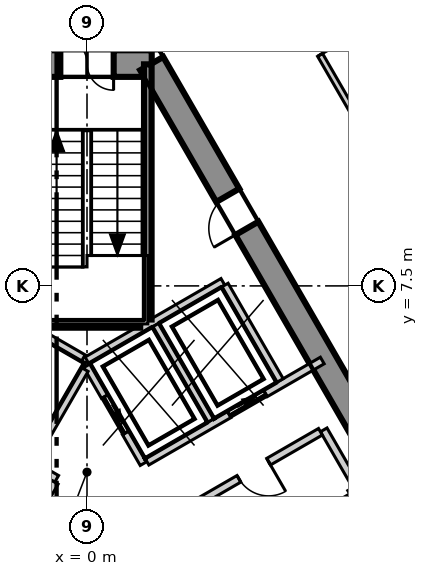
"""IFC4 building model, lengths in metres.
Left out: names, types, materials, properties, quantities, classifications, styles, units other than length and angle.
Written with IfcOpenShell. Run it as: python <this file> out.ifc"""

import sys

from ifc_helpers import new_model, si_unit, direction, frame, frame_2d, origin, place, context, subcontext, project, spatial, polyline, rectangle, outline, extrude, element, fill, save


model = new_model("IFC4")
c1 = context("Model", 3, precision=1e-05, world=origin(), true_north=direction((0.0, 1.0)))
c2 = subcontext(c1, "Body", "Model", "MODEL_VIEW")
j1 = project(units=[si_unit("LENGTHUNIT", "METRE"), si_unit("PLANEANGLEUNIT", "RADIAN")], contexts=[c1])
p1 = place(None, origin())
s1 = spatial("IfcSite", under=j1, at=p1, CompositionType="ELEMENT")
p2 = place(p1, origin())
s2 = spatial("IfcBuilding", under=s1, at=p2, CompositionType="ELEMENT")
p3 = place(p2, frame((0.0, 0.0, 203.3)))
s3 = spatial("IfcBuildingStorey", under=s2, at=p3, CompositionType="ELEMENT", Elevation=203.3)
p4 = place(p3, frame((1.703, 13.35, -0.3), z_axis=(0.0, 0.0, 1.0), x_axis=(-1.0, 0.0, 0.0)))
e1 = element("IfcWall", 1, at=p4, inside=s3, PredefinedType="SHEAR", context=c2, shape_type="SweptSolid", body=[
    extrude(outline(polyline([(-0.202, -0.35), (1.703, -0.35), (3.608, -0.35), (3.204, 0.35), (1.703, 0.35), (0.202, 0.35), (-0.202, -0.35)])), origin(), (0.0, 0.0, 1.0), 4.0),
])
p5 = place(p4, frame((1.003, 0.0, 0.3)))
e2 = element("IfcOpeningElement", 2, at=p5, cuts=e1, PredefinedType="OPENING", context=c2, shape_type="SweptSolid", body=[
    extrude(rectangle(XDim=1.4, YDim=2.1, at=frame_2d((0.7, 1.05))), frame((0.0, 0.36, 0.0), z_axis=(0.0, -1.0, 0.0), x_axis=(1.0, 0.0, 0.0)), (0.0, 0.0, 1.0), 0.72),
])
p6 = place(p3, frame((12.413, -5.2, -0.3), z_axis=(0.0, 0.0, 1.0), x_axis=(-0.500011533395, 0.866018744874, 0.0)))
e3 = element("IfcWall", 3, at=p6, inside=s3, PredefinedType="SHEAR", context=c2, shape_type="SweptSolid", body=[
    extrude(outline(polyline([(-0.202, -0.35), (1.782, -0.35), (3.766, -0.35), (5.75, -0.35), (7.734, -0.35), (9.718, -0.35), (11.702, -0.35), (13.686, -0.35), (15.67, -0.35), (17.654, -0.35), (19.638, -0.35), (21.622, -0.35), (21.218, 0.35), (19.307, 0.35), (17.397, 0.35), (15.486, 0.35), (13.576, 0.35), (11.665, 0.35), (9.755, 0.35), (7.844, 0.35), (5.934, 0.35), (4.023, 0.35), (2.113, 0.35), (0.202, 0.35), (-0.202, -0.35)])), origin(), (0.0, 0.0, 1.0), 4.0),
])
p7 = place(p6, frame((4.055, 0.0, 0.3)))
e4 = element("IfcOpeningElement", 4, at=p7, cuts=e3, PredefinedType="OPENING", context=c2, shape_type="SweptSolid", body=[
    extrude(rectangle(XDim=0.9, YDim=2.1, at=frame_2d((0.45, 1.05))), frame((0.0, 0.36, 0.0), z_axis=(0.0, -1.0, 0.0), x_axis=(1.0, 0.0, 0.0)), (0.0, 0.0, 1.0), 0.72),
])
p8 = place(p6, frame((16.415, 0.0, 0.3)))
e5 = element("IfcOpeningElement", 5, at=p8, cuts=e3, PredefinedType="OPENING", context=c2, shape_type="SweptSolid", body=[
    extrude(rectangle(XDim=1.0, YDim=2.1, at=frame_2d((0.5, 1.05))), frame((0.0, 0.36, 0.0), z_axis=(0.0, -1.0, 0.0), x_axis=(1.0, 0.0, 0.0)), (0.0, 0.0, 1.0), 0.72),
])
p9 = place(p3, frame((28.704, -13.311, 0.0), z_axis=(0.0, 0.0, 1.0), x_axis=(-0.500010281129, 0.866019467891, 0.0)))
e6 = element("IfcWall", 6, at=p9, inside=s3, PredefinedType="ELEMENTEDWALL", context=c2, shape_type="SweptSolid", body=[
    extrude(rectangle(XDim=51.739, YDim=0.2, at=frame_2d((25.87, 0.0))), origin(), (0.0, 0.0, 1.0), 3.7),
])
p10 = place(p9, frame((2.275, 0.0, 0.9)))
e7 = element("IfcOpeningElement", 7, at=p10, cuts=e6, PredefinedType="OPENING", context=c2, shape_type="SweptSolid", body=[
    extrude(rectangle(XDim=4.2, YDim=2.5, at=frame_2d((2.1, 1.25))), frame((0.0, 0.11, 0.0), z_axis=(0.0, -1.0, 0.0), x_axis=(1.0, 0.0, 0.0)), (0.0, 0.0, 1.0), 0.22),
])
p11 = place(p9, frame((8.419, 0.0, 0.9)))
e8 = element("IfcOpeningElement", 8, at=p11, cuts=e6, PredefinedType="OPENING", context=c2, shape_type="SweptSolid", body=[
    extrude(rectangle(XDim=4.2, YDim=2.5, at=frame_2d((2.1, 1.25))), frame((0.0, 0.11, 0.0), z_axis=(0.0, -1.0, 0.0), x_axis=(1.0, 0.0, 0.0)), (0.0, 0.0, 1.0), 0.22),
])
p12 = place(p9, frame((14.563, 0.0, 0.9)))
e9 = element("IfcOpeningElement", 9, at=p12, cuts=e6, PredefinedType="OPENING", context=c2, shape_type="SweptSolid", body=[
    extrude(rectangle(XDim=4.2, YDim=2.5, at=frame_2d((2.1, 1.25))), frame((0.0, 0.11, 0.0), z_axis=(0.0, -1.0, 0.0), x_axis=(1.0, 0.0, 0.0)), (0.0, 0.0, 1.0), 0.22),
])
p13 = place(p9, frame((20.707, 0.0, 0.9)))
e10 = element("IfcOpeningElement", 10, at=p13, cuts=e6, PredefinedType="OPENING", context=c2, shape_type="SweptSolid", body=[
    extrude(rectangle(XDim=4.2, YDim=2.5, at=frame_2d((2.1, 1.25))), frame((0.0, 0.11, 0.0), z_axis=(0.0, -1.0, 0.0), x_axis=(1.0, 0.0, 0.0)), (0.0, 0.0, 1.0), 0.22),
])
p14 = place(p9, frame((26.852, 0.0, 0.9)))
e11 = element("IfcOpeningElement", 11, at=p14, cuts=e6, PredefinedType="OPENING", context=c2, shape_type="SweptSolid", body=[
    extrude(rectangle(XDim=4.2, YDim=2.5, at=frame_2d((2.1, 1.25))), frame((0.0, 0.11, 0.0), z_axis=(0.0, -1.0, 0.0), x_axis=(1.0, 0.0, 0.0)), (0.0, 0.0, 1.0), 0.22),
])
p15 = place(p9, frame((32.996, 0.0, 0.9)))
e12 = element("IfcOpeningElement", 12, at=p15, cuts=e6, PredefinedType="OPENING", context=c2, shape_type="SweptSolid", body=[
    extrude(rectangle(XDim=4.2, YDim=2.5, at=frame_2d((2.1, 1.25))), frame((0.0, 0.11, 0.0), z_axis=(0.0, -1.0, 0.0), x_axis=(1.0, 0.0, 0.0)), (0.0, 0.0, 1.0), 0.22),
])
p16 = place(p9, frame((39.14, 0.0, 0.9)))
e13 = element("IfcOpeningElement", 13, at=p16, cuts=e6, PredefinedType="OPENING", context=c2, shape_type="SweptSolid", body=[
    extrude(rectangle(XDim=4.2, YDim=2.5, at=frame_2d((2.1, 1.25))), frame((0.0, 0.11, 0.0), z_axis=(0.0, -1.0, 0.0), x_axis=(1.0, 0.0, 0.0)), (0.0, 0.0, 1.0), 0.22),
])
p17 = place(p9, frame((45.284, 0.0, 0.9)))
e14 = element("IfcOpeningElement", 14, at=p17, cuts=e6, PredefinedType="OPENING", context=c2, shape_type="SweptSolid", body=[
    extrude(rectangle(XDim=4.2, YDim=2.5, at=frame_2d((2.1, 1.25))), frame((0.0, 0.11, 0.0), z_axis=(0.0, -1.0, 0.0), x_axis=(1.0, 0.0, 0.0)), (0.0, 0.0, 1.0), 0.22),
])
p18 = place(p3, frame((-20.883, -11.97, 0.0), z_axis=(0.0, 0.0, 1.0), x_axis=(0.500006150555, 0.866021852731, 0.0)))
e15 = element("IfcWall", 15, at=p18, inside=s3, PredefinedType="PARTITIONING", context=c2, shape_type="SweptSolid", body=[
    extrude(rectangle(XDim=41.766, YDim=0.15, at=frame_2d((20.883, 0.0))), origin(), (0.0, 0.0, 1.0), 3.7),
])
p19 = place(p18, frame((36.916, 0.0, 0.0)))
e16 = element("IfcOpeningElement", 16, at=p19, cuts=e15, PredefinedType="OPENING", context=c2, shape_type="SweptSolid", body=[
    extrude(rectangle(XDim=1.1, YDim=2.1, at=frame_2d((0.55, 1.05))), frame((0.0, 0.085, 0.0), z_axis=(0.0, -1.0, 0.0), x_axis=(1.0, 0.0, 0.0)), (0.0, 0.0, 1.0), 0.17),
])
p20 = place(p18, frame((26.446, 0.0, 0.0)))
e17 = element("IfcOpeningElement", 17, at=p20, cuts=e15, PredefinedType="OPENING", context=c2, shape_type="SweptSolid", body=[
    extrude(rectangle(XDim=1.1, YDim=2.1, at=frame_2d((0.55, 1.05))), frame((0.0, 0.085, 0.0), z_axis=(0.0, -1.0, 0.0), x_axis=(1.0, 0.0, 0.0)), (0.0, 0.0, 1.0), 0.17),
])
p21 = place(p18, frame((9.757, 0.0, 0.0)))
e18 = element("IfcOpeningElement", 18, at=p21, cuts=e15, PredefinedType="OPENING", context=c2, shape_type="SweptSolid", body=[
    extrude(rectangle(XDim=1.1, YDim=2.1, at=frame_2d((0.55, 1.05))), frame((0.0, 0.085, 0.0), z_axis=(0.0, -1.0, 0.0), x_axis=(1.0, 0.0, 0.0)), (0.0, 0.0, 1.0), 0.17),
])
p22 = place(p18, frame((18.757, 0.0, 0.0)))
e19 = element("IfcOpeningElement", 19, at=p22, cuts=e15, PredefinedType="OPENING", context=c2, shape_type="SweptSolid", body=[
    extrude(rectangle(XDim=0.9, YDim=2.1, at=frame_2d((0.45, 1.05))), frame((0.0, 0.085, 0.0), z_axis=(0.0, -1.0, 0.0), x_axis=(1.0, 0.0, 0.0)), (0.0, 0.0, 1.0), 0.17),
])
p23 = place(p18, frame((15.557, 0.0, 0.0)))
e20 = element("IfcOpeningElement", 20, at=p23, cuts=e15, PredefinedType="OPENING", context=c2, shape_type="SweptSolid", body=[
    extrude(rectangle(XDim=0.9, YDim=2.1, at=frame_2d((0.45, 1.05))), frame((0.0, 0.085, 0.0), z_axis=(0.0, -1.0, 0.0), x_axis=(1.0, 0.0, 0.0)), (0.0, 0.0, 1.0), 0.17),
])
p24 = place(p18, frame((12.657, 0.0, 0.0)))
e21 = element("IfcOpeningElement", 21, at=p24, cuts=e15, PredefinedType="OPENING", context=c2, shape_type="SweptSolid", body=[
    extrude(rectangle(XDim=1.0, YDim=2.1, at=frame_2d((0.5, 1.05))), frame((0.0, 0.085, 0.0), z_axis=(0.0, -1.0, 0.0), x_axis=(1.0, 0.0, 0.0)), (0.0, 0.0, 1.0), 0.17),
])
p25 = place(p18, frame((3.669, 0.0, 0.0)))
e22 = element("IfcOpeningElement", 22, at=p25, cuts=e15, PredefinedType="OPENING", context=c2, shape_type="SweptSolid", body=[
    extrude(rectangle(XDim=1.1, YDim=2.1, at=frame_2d((0.55, 1.05))), frame((0.0, 0.085, 0.0), z_axis=(0.0, -1.0, 0.0), x_axis=(1.0, 0.0, 0.0)), (0.0, 0.0, 1.0), 0.17),
])
p26 = place(p3, frame((0.075, 24.07, 0.0), z_axis=(0.0, 0.0, 1.0), x_axis=(0.500006834213, -0.866021458014, 0.0)))
e23 = element("IfcWall", 23, at=p26, inside=s3, PredefinedType="PARTITIONING", context=c2, shape_type="SweptSolid", body=[
    extrude(rectangle(XDim=41.616, YDim=0.15, at=frame_2d((20.808, 0.0))), origin(), (0.0, 0.0, 1.0), 3.7),
])
p27 = place(p26, frame((36.915, 0.0, 0.0)))
e24 = element("IfcOpeningElement", 24, at=p27, cuts=e23, PredefinedType="OPENING", context=c2, shape_type="SweptSolid", body=[
    extrude(rectangle(XDim=1.1, YDim=2.1, at=frame_2d((0.55, 1.05))), frame((0.0, 0.085, 0.0), z_axis=(0.0, -1.0, 0.0), x_axis=(1.0, 0.0, 0.0)), (0.0, 0.0, 1.0), 0.17),
])
p28 = place(p26, frame((22.046, 0.0, 0.0)))
e25 = element("IfcOpeningElement", 25, at=p28, cuts=e23, PredefinedType="OPENING", context=c2, shape_type="SweptSolid", body=[
    extrude(rectangle(XDim=1.1, YDim=2.1, at=frame_2d((0.55, 1.05))), frame((0.0, 0.085, 0.0), z_axis=(0.0, -1.0, 0.0), x_axis=(1.0, 0.0, 0.0)), (0.0, 0.0, 1.0), 0.17),
])
p29 = place(p26, frame((31.046, 0.0, 0.0)))
e26 = element("IfcOpeningElement", 26, at=p29, cuts=e23, PredefinedType="OPENING", context=c2, shape_type="SweptSolid", body=[
    extrude(rectangle(XDim=0.9, YDim=2.1, at=frame_2d((0.45, 1.05))), frame((0.0, 0.085, 0.0), z_axis=(0.0, -1.0, 0.0), x_axis=(1.0, 0.0, 0.0)), (0.0, 0.0, 1.0), 0.17),
])
p30 = place(p26, frame((27.846, 0.0, 0.0)))
e27 = element("IfcOpeningElement", 27, at=p30, cuts=e23, PredefinedType="OPENING", context=c2, shape_type="SweptSolid", body=[
    extrude(rectangle(XDim=0.9, YDim=2.1, at=frame_2d((0.45, 1.05))), frame((0.0, 0.085, 0.0), z_axis=(0.0, -1.0, 0.0), x_axis=(1.0, 0.0, 0.0)), (0.0, 0.0, 1.0), 0.17),
])
p31 = place(p26, frame((24.946, 0.0, 0.0)))
e28 = element("IfcOpeningElement", 28, at=p31, cuts=e23, PredefinedType="OPENING", context=c2, shape_type="SweptSolid", body=[
    extrude(rectangle(XDim=1.0, YDim=2.1, at=frame_2d((0.5, 1.05))), frame((0.0, 0.085, 0.0), z_axis=(0.0, -1.0, 0.0), x_axis=(1.0, 0.0, 0.0)), (0.0, 0.0, 1.0), 0.17),
])
p32 = place(p26, frame((17.258, 0.0, 0.0)))
e29 = element("IfcOpeningElement", 29, at=p32, cuts=e23, PredefinedType="OPENING", context=c2, shape_type="SweptSolid", body=[
    extrude(rectangle(XDim=1.0, YDim=2.1, at=frame_2d((0.5, 1.05))), frame((0.0, 0.085, 0.0), z_axis=(0.0, -1.0, 0.0), x_axis=(1.0, 0.0, 0.0)), (0.0, 0.0, 1.0), 0.17),
])
p33 = place(p26, frame((11.114, 0.0, 0.0)))
e30 = element("IfcOpeningElement", 30, at=p33, cuts=e23, PredefinedType="OPENING", context=c2, shape_type="SweptSolid", body=[
    extrude(rectangle(XDim=1.0, YDim=2.1, at=frame_2d((0.5, 1.05))), frame((0.0, 0.085, 0.0), z_axis=(0.0, -1.0, 0.0), x_axis=(1.0, 0.0, 0.0)), (0.0, 0.0, 1.0), 0.17),
])
p34 = place(p26, frame((3.669, 0.0, 0.0)))
e31 = element("IfcOpeningElement", 31, at=p34, cuts=e23, PredefinedType="OPENING", context=c2, shape_type="SweptSolid", body=[
    extrude(rectangle(XDim=1.0, YDim=2.1, at=frame_2d((0.5, 1.05))), frame((0.0, 0.085, 0.0), z_axis=(0.0, -1.0, 0.0), x_axis=(1.0, 0.0, 0.0)), (0.0, 0.0, 1.0), 0.17),
])
p35 = place(p3, frame((-0.002, 5.541, 0.0), z_axis=(0.0, 0.0, 1.0), x_axis=(0.86600155993, 0.500041296494, 0.0)))
e32 = element("IfcWall", 32, at=p35, inside=s3, PredefinedType="SOLIDWALL", context=c2, shape_type="SweptSolid", body=[
    extrude(rectangle(XDim=4.132, YDim=0.2, at=frame_2d((2.066, 0.0))), origin(), (0.0, 0.0, 1.0), 3.7),
])
p36 = place(p3, frame((0.0, 5.4, 0.0), z_axis=(0.0, 0.0, 1.0), x_axis=(0.500103862429, -0.865965430478, 0.0)))
e33 = element("IfcWall", 33, at=p36, inside=s3, PredefinedType="SOLIDWALL", context=c2, shape_type="SweptSolid", body=[
    extrude(rectangle(XDim=2.973, YDim=0.2, at=frame_2d((1.487, 0.0))), origin(), (0.0, 0.0, 1.0), 3.7),
])
p37 = place(p36, frame((0.937, 0.0, 0.0)))
e34 = element("IfcOpeningElement", 34, at=p37, cuts=e33, PredefinedType="OPENING", context=c2, shape_type="SweptSolid", body=[
    extrude(rectangle(XDim=1.1, YDim=2.1, at=frame_2d((0.55, 1.05))), frame((0.0, 0.11, 0.0), z_axis=(0.0, -1.0, 0.0), x_axis=(1.0, 0.0, 0.0)), (0.0, 0.0, 1.0), 0.22),
])
p38 = place(p3, frame((1.578, 2.874, 0.0), z_axis=(0.0, 0.0, 1.0), x_axis=(0.866045911672, 0.499964477614, 0.0)))
e35 = element("IfcWall", 35, at=p38, inside=s3, PredefinedType="SOLIDWALL", context=c2, shape_type="SweptSolid", body=[
    extrude(rectangle(XDim=5.327, YDim=0.2, at=frame_2d((2.663, 0.0))), origin(), (0.0, 0.0, 1.0), 3.7),
])
p39 = place(p38, frame((2.496, 0.0, 0.0)))
e36 = element("IfcOpeningElement", 36, at=p39, cuts=e35, PredefinedType="OPENING", context=c2, shape_type="SweptSolid", body=[
    extrude(rectangle(XDim=1.1, YDim=2.1, at=frame_2d((0.55, 1.05))), frame((0.0, 0.11, 0.0), z_axis=(0.0, -1.0, 0.0), x_axis=(1.0, 0.0, 0.0)), (0.0, 0.0, 1.0), 0.22),
])
for number, where, z_axis, x_axis in (
    (37, (3.626, 7.52, 0.0), (0.0, 0.0, 1.0), (0.5, -0.866, 0.0)),
    (38, (1.807, 6.47, 0.0), (0.0, 0.0, 1.0), (0.5, -0.866, 0.0)),
):
    element("IfcWall", number, at=place(p3, frame(where, z_axis=z_axis, x_axis=x_axis)), inside=s3, PredefinedType="SOLIDWALL", context=c2, shape_type="SweptSolid", body=[
        extrude(rectangle(XDim=2.9, YDim=0.2, at=frame_2d((1.45, 0.0))), origin(), (0.0, 0.0, 1.0), 3.7),
    ])
p40 = place(p3, frame((6.229, 3.712, 0.0), z_axis=(0.0, 0.0, 1.0), x_axis=(0.499875724984, -0.86609714211, 0.0)))
e39 = element("IfcWall", 39, at=p40, inside=s3, PredefinedType="SOLIDWALL", context=c2, shape_type="SweptSolid", body=[
    extrude(rectangle(XDim=1.701, YDim=0.2, at=frame_2d((0.85, 0.0))), origin(), (0.0, 0.0, 1.0), 3.7),
])
p41 = place(p3, frame((2.548, 1.587, 0.0), z_axis=(0.0, 0.0, 1.0), x_axis=(0.866004344652, 0.500036473714, 0.0)))
e40 = element("IfcWall", 40, at=p41, inside=s3, PredefinedType="SOLIDWALL", context=c2, shape_type="SweptSolid", body=[
    extrude(rectangle(XDim=4.15, YDim=0.2, at=frame_2d((2.075, 0.0))), origin(), (0.0, 0.0, 1.0), 3.7),
])
p42 = place(p41, frame((1.675, 0.0, 0.0)))
e41 = element("IfcOpeningElement", 41, at=p42, cuts=e40, PredefinedType="OPENING", context=c2, shape_type="SweptSolid", body=[
    extrude(rectangle(XDim=0.9, YDim=2.1, at=frame_2d((0.45, 1.05))), frame((0.0, 0.11, 0.0), z_axis=(0.0, -1.0, 0.0), x_axis=(1.0, 0.0, 0.0)), (0.0, 0.0, 1.0), 0.22),
])
p43 = place(p3, frame((-1.488, 2.822, 0.0), z_axis=(0.0, 0.0, 1.0), x_axis=(0.866236612152, -0.499633997809, 0.0)))
e42 = element("IfcWall", 42, at=p43, inside=s3, PredefinedType="SOLIDWALL", context=c2, shape_type="SweptSolid", body=[
    extrude(rectangle(XDim=0.796, YDim=0.2, at=frame_2d((0.398, 0.0))), origin(), (0.0, 0.0, 1.0), 3.7),
])
p44 = place(p3, frame((-2.444, -0.433, 0.0), z_axis=(0.0, 0.0, 1.0), x_axis=(0.500035624827, 0.866004834804, 0.0)))
e43 = element("IfcWall", 43, at=p44, inside=s3, PredefinedType="SOLIDWALL", context=c2, shape_type="SweptSolid", body=[
    extrude(rectangle(XDim=3.194, YDim=0.2, at=frame_2d((1.597, 0.0))), origin(), (0.0, 0.0, 1.0), 3.7),
])
p45 = place(p3, frame((-1.67, 6.507, 0.0), z_axis=(0.0, 0.0, 1.0), x_axis=(0.865941441609, -0.500145398563, 0.0)))
e44 = element("IfcWall", 44, at=p45, inside=s3, PredefinedType="SOLIDWALL", context=c2, shape_type="SweptSolid", body=[
    extrude(rectangle(XDim=1.815, YDim=0.2, at=frame_2d((0.908, 0.0))), origin(), (0.0, 0.0, 1.0), 3.7),
])
p46 = place(p3, frame((-1.438, 2.909, 0.0), z_axis=(0.0, 0.0, 1.0), x_axis=(0.499829630636, 0.866123744241, 0.0)))
e45 = element("IfcWall", 45, at=p46, inside=s3, PredefinedType="SOLIDWALL", context=c2, shape_type="SweptSolid", body=[
    extrude(rectangle(XDim=2.761, YDim=0.2, at=frame_2d((1.38, 0.0))), origin(), (0.0, 0.0, 1.0), 3.7),
])
p47 = place(p3, frame((6.826, 1.978, 0.0), z_axis=(0.0, 0.0, 1.0), x_axis=(0.499990139034, -0.866031096941, 0.0)))
e46 = element("IfcWall", 46, at=p47, inside=s3, PredefinedType="SOLIDWALL", context=c2, shape_type="SweptSolid", body=[
    extrude(rectangle(XDim=3.0, YDim=0.2, at=frame_2d((1.5, 0.0))), origin(), (0.0, 0.0, 1.0), 3.7),
])
p48 = place(p3, frame((1.6, 6.615, 0.0), z_axis=(0.0, 0.0, 1.0), x_axis=(0.0, 1.0, 0.0)))
e47 = element("IfcWall", 47, at=p48, inside=s3, PredefinedType="SOLIDWALL", context=c2, shape_type="SweptSolid", body=[
    extrude(rectangle(XDim=6.715, YDim=0.2, at=frame_2d((3.357, 0.0))), origin(), (0.0, 0.0, 1.0), 3.7),
])
p49 = place(p3, frame((-1.4, 6.5, 0.0), z_axis=(0.0, 0.0, 1.0), x_axis=(1.0, 0.0, 0.0)))
e48 = element("IfcWall", 48, at=p49, inside=s3, PredefinedType="SOLIDWALL", context=c2, shape_type="SweptSolid", body=[
    extrude(rectangle(XDim=2.8, YDim=0.2, at=frame_2d((1.4, 0.0))), origin(), (0.0, 0.0, 1.0), 3.7),
])
p50 = place(p37, origin())
e49 = element("IfcDoor", 49, at=p50, inside=s3, OperationType="SLIDING_TO_LEFT", PredefinedType="DOOR", context=c2, shape_type="SweptSolid", body=[
    extrude(rectangle(XDim=1.1, YDim=2.1, at=frame_2d((0.55, 1.05))), frame((0.0, 0.025, 0.0), z_axis=(0.0, -1.0, 0.0), x_axis=(1.0, 0.0, 0.0)), (0.0, 0.0, 1.0), 0.05),
])
fill(e34, e49)
p51 = place(p39, origin())
e50 = element("IfcDoor", 50, at=p51, inside=s3, OperationType="SLIDING_TO_LEFT", PredefinedType="DOOR", context=c2, shape_type="SweptSolid", body=[
    extrude(rectangle(XDim=1.1, YDim=2.1, at=frame_2d((0.55, 1.05))), frame((0.0, 0.025, 0.0), z_axis=(0.0, -1.0, 0.0), x_axis=(1.0, 0.0, 0.0)), (0.0, 0.0, 1.0), 0.05),
])
fill(e36, e50)
p52 = place(p33, origin())
e51 = element("IfcDoor", 51, at=p52, inside=s3, OperationType="SINGLE_SWING_LEFT", PredefinedType="DOOR", context=c2, shape_type="SweptSolid", body=[
    extrude(rectangle(XDim=1.0, YDim=2.1, at=frame_2d((0.5, 1.05))), frame((0.0, 0.025, 0.0), z_axis=(0.0, -1.0, 0.0), x_axis=(1.0, 0.0, 0.0)), (0.0, 0.0, 1.0), 0.05),
])
fill(e30, e51)
p53 = place(p5, origin())
e52 = element("IfcDoor", 52, at=p53, inside=s3, OperationType="DOUBLE_DOOR_SINGLE_SWING", PredefinedType="DOOR", context=c2, shape_type="SweptSolid", body=[
    extrude(rectangle(XDim=1.4, YDim=2.1, at=frame_2d((0.7, 1.05))), frame((0.0, 0.025, 0.0), z_axis=(0.0, -1.0, 0.0), x_axis=(1.0, 0.0, 0.0)), (0.0, 0.0, 1.0), 0.05),
])
fill(e2, e52)
p54 = place(p8, origin())
e53 = element("IfcDoor", 53, at=p54, inside=s3, OperationType="SINGLE_SWING_RIGHT", PredefinedType="DOOR", context=c2, shape_type="SweptSolid", body=[
    extrude(rectangle(XDim=1.0, YDim=2.1, at=frame_2d((0.5, 1.05))), frame((0.0, 0.025, 0.0), z_axis=(0.0, -1.0, 0.0), x_axis=(1.0, 0.0, 0.0)), (0.0, 0.0, 1.0), 0.05),
])
fill(e5, e53)
p55 = place(p42, origin())
e54 = element("IfcDoor", 54, at=p55, inside=s3, OperationType="SINGLE_SWING_RIGHT", PredefinedType="DOOR", context=c2, shape_type="SweptSolid", body=[
    extrude(rectangle(XDim=0.9, YDim=2.1, at=frame_2d((0.45, 1.05))), frame((0.0, 0.025, 0.0), z_axis=(0.0, -1.0, 0.0), x_axis=(1.0, 0.0, 0.0)), (0.0, 0.0, 1.0), 0.05),
])
fill(e41, e54)
save(model, sys.argv[1])
